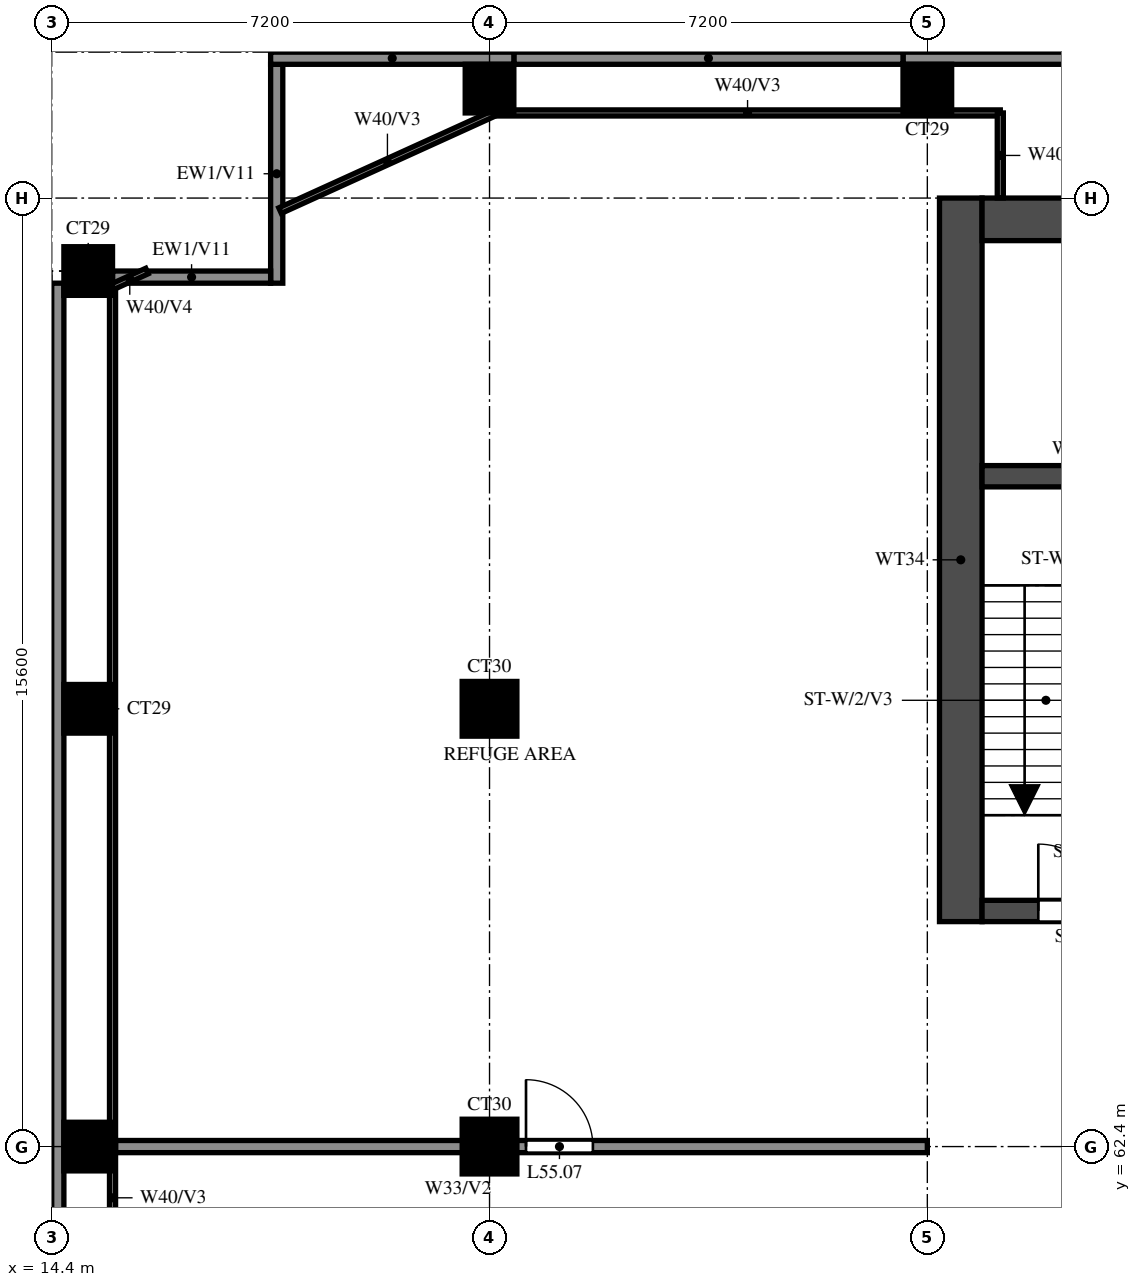
"""IFC4 building model, lengths in metres.
Left out: names, types, materials, properties, quantities, classifications, styles, units other than length and angle.
Written with IfcOpenShell. Run it as: python <this file> out.ifc"""

import sys

from ifc_helpers import new_model, si_unit, direction, frame, frame_2d, origin, origin_2d, place, context, subcontext, project, spatial, rectangle, extrude, source, transform, mapped, element, fill, save


model = new_model("IFC4")
c1 = context("Model", 3, precision=1e-05, world=origin(), true_north=direction((0.0, 1.0)))
c2 = subcontext(c1, "Body", "Model", "MODEL_VIEW")
j1 = project(units=[si_unit("LENGTHUNIT", "METRE"), si_unit("PLANEANGLEUNIT", "RADIAN")], contexts=[c1])
p1 = place(None, origin())
s1 = spatial("IfcSite", under=j1, at=p1, CompositionType="ELEMENT")
p2 = place(p1, origin())
s2 = spatial("IfcBuilding", under=s1, at=p2, CompositionType="ELEMENT")
p3 = place(p2, frame((0.0, 0.0, 206.0)))
s3 = spatial("IfcBuildingStorey", under=s2, at=p3, CompositionType="ELEMENT", Elevation=206.0)
m1 = source(origin(), c2, "Body", "SweptSolid", [
    extrude(rectangle(XDim=0.8, YDim=0.8, at=origin_2d()), origin(), (0.0, 0.0, 1.0), 5.22),
])
p4 = place(p3, frame((15.0, 62.4, 0.0), z_axis=(0.0, 0.0, 1.0), x_axis=(1.0, 0.0, 0.0)))
e1 = element("IfcColumn", 1, at=p4, inside=s3, PredefinedType="COLUMN", context=c2, shape_type="MappedRepresentation", body=[
    mapped(m1, transform((0.0, 0.0, 0.0))),
])
m2 = source(origin(), c2, "Body", "SweptSolid", [
    extrude(rectangle(XDim=0.9, YDim=0.9, at=origin_2d()), origin(), (0.0, 0.0, 1.0), 5.22),
])
p5 = place(p3, frame((21.6, 62.4, 0.0), z_axis=(0.0, 0.0, 1.0), x_axis=(1.0, 0.0, 0.0)))
e2 = element("IfcColumn", 2, at=p5, inside=s3, PredefinedType="COLUMN", context=c2, shape_type="MappedRepresentation", body=[
    mapped(m2, transform((0.0, 0.0, 0.0))),
])
p6 = place(p3, frame((15.0, 69.6, 0.0), z_axis=(0.0, 0.0, 1.0), x_axis=(1.0, 0.0, 0.0)))
e3 = element("IfcColumn", 3, at=p6, inside=s3, PredefinedType="COLUMN", context=c2, shape_type="MappedRepresentation", body=[
    mapped(m1, transform((0.0, 0.0, 0.0))),
])
p7 = place(p3, frame((21.6, 69.6, 0.0), z_axis=(0.0, 0.0, 1.0), x_axis=(1.0, 0.0, 0.0)))
e4 = element("IfcColumn", 4, at=p7, inside=s3, PredefinedType="COLUMN", context=c2, shape_type="MappedRepresentation", body=[
    mapped(m2, transform((0.0, 0.0, 0.0))),
])
for number, where, z_axis, x_axis in (
    (5, (15.0, 76.8, 0.0), (0.0, 0.0, 1.0), (1.0, 0.0, 0.0)),
    (6, (21.6, 79.8, 0.0), (0.0, 0.0, 1.0), (1.0, 0.0, 0.0)),
    (7, (28.8, 79.8, 0.0), (0.0, 0.0, 1.0), (1.0, 0.0, 0.0)),
):
    element("IfcColumn", number, at=place(p3, frame(where, z_axis=z_axis, x_axis=x_axis)), inside=s3, PredefinedType="COLUMN", context=c2, shape_type="MappedRepresentation", body=[
        mapped(m1, transform((0.0, 0.0, 0.0))),
    ])
p8 = place(p3, frame((29.35, 66.1, 0.0), z_axis=(0.0, 0.0, 1.0), x_axis=(0.0, 1.0, 0.0)))
e8 = element("IfcWall", 8, at=p8, inside=s3, PredefinedType="SHEAR", context=c2, shape_type="SweptSolid", body=[
    extrude(rectangle(XDim=11.9, YDim=0.7, at=frame_2d((5.95, 0.0))), origin(), (0.0, 0.0, 1.0), 5.22),
])
p9 = place(p3, frame((29.7, 77.65, 0.0), z_axis=(0.0, 0.0, 1.0), x_axis=(1.0, 0.0, 0.0)))
e9 = element("IfcWall", 9, at=p9, inside=s3, PredefinedType="SHEAR", context=c2, shape_type="SweptSolid", body=[
    extrude(rectangle(XDim=41.4, YDim=0.7, at=frame_2d((20.7, 0.0))), origin(), (0.0, 0.0, 1.0), 5.22),
])
p10 = place(p3, frame((29.7, 66.275, 0.0), z_axis=(0.0, 0.0, 1.0), x_axis=(1.0, 0.0, 0.0)))
e10 = element("IfcWall", 10, at=p10, inside=s3, PredefinedType="SHEAR", context=c2, shape_type="SweptSolid", body=[
    extrude(rectangle(XDim=41.4, YDim=0.35, at=frame_2d((20.7, 0.0))), origin(), (0.0, 0.0, 1.0), 5.22),
])
p11 = place(p10, frame((0.925, 0.0, 0.0)))
e11 = element("IfcOpeningElement", 11, at=p11, cuts=e10, PredefinedType="OPENING", context=c2, shape_type="SweptSolid", body=[
    extrude(rectangle(XDim=1.1, YDim=2.1, at=frame_2d((0.55, 1.05))), frame((0.0, 0.185, 0.0), z_axis=(0.0, -1.0, 0.0), x_axis=(1.0, 0.0, 0.0)), (0.0, 0.0, 1.0), 0.37),
])
p12 = place(p10, frame((3.712, 0.0, 0.0)))
e12 = element("IfcOpeningElement", 12, at=p12, cuts=e10, PredefinedType="OPENING", context=c2, shape_type="SweptSolid", body=[
    extrude(rectangle(XDim=1.8, YDim=2.1, at=frame_2d((0.9, 1.05))), frame((0.0, 0.185, 0.0), z_axis=(0.0, -1.0, 0.0), x_axis=(1.0, 0.0, 0.0)), (0.0, 0.0, 1.0), 0.37),
])
p13 = place(p3, frame((29.7, 73.425, 0.0), z_axis=(0.0, 0.0, 1.0), x_axis=(1.0, 0.0, 0.0)))
e13 = element("IfcWall", 13, at=p13, inside=s3, PredefinedType="SHEAR", context=c2, shape_type="SweptSolid", body=[
    extrude(rectangle(XDim=3.125, YDim=0.35, at=frame_2d((1.562, 0.0))), origin(), (0.0, 0.0, 1.0), 5.22),
])
p14 = place(p3, frame((18.1, 80.2, 0.0), z_axis=(0.0, 0.0, 1.0), x_axis=(0.0, -1.0, 0.0)))
e14 = element("IfcWall", 14, at=p14, inside=s3, PredefinedType="SOLIDWALL", context=c2, shape_type="SweptSolid", body=[
    extrude(rectangle(XDim=3.6, YDim=0.2, at=frame_2d((1.8, 0.0))), origin(), (0.0, 0.0, 1.0), 5.22),
])
p15 = place(p3, frame((18.0, 76.7, 0.0), z_axis=(0.0, 0.0, 1.0), x_axis=(-1.0, 0.0, 0.0)))
e15 = element("IfcWall", 15, at=p15, inside=s3, PredefinedType="SOLIDWALL", context=c2, shape_type="SweptSolid", body=[
    extrude(rectangle(XDim=2.6, YDim=0.2, at=frame_2d((1.3, 0.0))), origin(), (0.0, 0.0, 1.0), 5.22),
])
p16 = place(p3, frame((14.5, 76.6, 0.0), z_axis=(0.0, 0.0, 1.0), x_axis=(0.0, -1.0, 0.0)))
e16 = element("IfcWall", 16, at=p16, inside=s3, PredefinedType="SOLIDWALL", context=c2, shape_type="SweptSolid", body=[
    extrude(rectangle(XDim=33.4, YDim=0.2, at=frame_2d((16.7, 0.0))), origin(), (0.0, 0.0, 1.0), 5.22),
])
p17 = place(p3, frame((15.45, 62.4, 0.0), z_axis=(0.0, 0.0, 1.0), x_axis=(1.0, 0.0, 0.0)))
e17 = element("IfcWall", 17, at=p17, inside=s3, PredefinedType="SOLIDWALL", context=c2, shape_type="SweptSolid", body=[
    extrude(rectangle(XDim=13.35, YDim=0.2, at=frame_2d((6.675, 0.0))), origin(), (0.0, 0.0, 1.0), 3.72),
])
p18 = place(p17, frame((6.75, 0.0, 0.0)))
e18 = element("IfcOpeningElement", 18, at=p18, cuts=e17, PredefinedType="OPENING", context=c2, shape_type="SweptSolid", body=[
    extrude(rectangle(XDim=1.1, YDim=2.1, at=frame_2d((0.55, 1.05))), frame((0.0, 0.11, 0.0), z_axis=(0.0, -1.0, 0.0), x_axis=(1.0, 0.0, 0.0)), (0.0, 0.0, 1.0), 0.22),
])
p19 = place(p3, frame((21.687, 79.4, 0.0), z_axis=(0.0, 0.0, 1.0), x_axis=(1.0, 0.0, 0.0)))
e19 = element("IfcWall", 19, at=p19, inside=s3, PredefinedType="PARTITIONING", context=c2, shape_type="SweptSolid", body=[
    extrude(rectangle(XDim=8.313, YDim=0.1, at=frame_2d((4.156, 0.0))), origin(), (0.0, 0.0, 1.0), 3.72),
])
p20 = place(p3, frame((15.4, 48.0, 0.0), z_axis=(0.0, 0.0, 1.0), x_axis=(0.0, 1.0, 0.0)))
e20 = element("IfcWall", 20, at=p20, inside=s3, PredefinedType="PARTITIONING", context=c2, shape_type="SweptSolid", body=[
    extrude(rectangle(XDim=28.542, YDim=0.1, at=frame_2d((14.271, 0.0))), origin(), (0.0, 0.0, 1.0), 3.72),
])
p21 = place(p3, frame((30.0, 78.002, 0.0), z_axis=(0.0, 0.0, 1.0), x_axis=(0.0, 1.0, 0.0)))
e21 = element("IfcWall", 21, at=p21, inside=s3, PredefinedType="PARTITIONING", context=c2, shape_type="SweptSolid", body=[
    extrude(rectangle(XDim=1.398, YDim=0.1, at=frame_2d((0.699, 0.0))), origin(), (0.0, 0.0, 1.0), 5.22),
])
p22 = place(p3, frame((15.967, 76.8, 0.0), z_axis=(0.0, 0.0, 1.0), x_axis=(-0.910205385289, -0.41415716412, 0.0)))
e22 = element("IfcWall", 22, at=p22, inside=s3, PredefinedType="PARTITIONING", context=c2, shape_type="SweptSolid", body=[
    extrude(rectangle(XDim=0.623, YDim=0.1, at=frame_2d((0.312, 0.0))), origin(), (0.0, 0.0, 1.0), 5.22),
])
p23 = place(p3, frame((21.687, 79.4, 0.0), z_axis=(0.0, 0.0, 1.0), x_axis=(-0.910316907758, -0.413911980316, 0.0)))
e23 = element("IfcWall", 23, at=p23, inside=s3, PredefinedType="PARTITIONING", context=c2, shape_type="SweptSolid", body=[
    extrude(rectangle(XDim=3.88, YDim=0.1, at=frame_2d((1.94, 0.0))), origin(), (0.0, 0.0, 1.0), 3.72),
])
p24 = place(p3, frame((72.4, 80.3, 0.0), z_axis=(0.0, 0.0, 1.0), x_axis=(-1.0, 0.0, 0.0)))
e24 = element("IfcWall", 24, at=p24, inside=s3, PredefinedType="SOLIDWALL", context=c2, shape_type="SweptSolid", body=[
    extrude(rectangle(XDim=44.0, YDim=0.2, at=frame_2d((22.0, 0.0))), origin(), (0.0, 0.0, 1.0), 5.22),
])
p25 = place(p3, frame((28.4, 80.3, 0.0), z_axis=(0.0, 0.0, 1.0), x_axis=(-1.0, 0.0, 0.0)))
e25 = element("IfcWall", 25, at=p25, inside=s3, PredefinedType="SOLIDWALL", context=c2, shape_type="SweptSolid", body=[
    extrude(rectangle(XDim=6.4, YDim=0.2, at=frame_2d((3.2, 0.0))), origin(), (0.0, 0.0, 1.0), 3.72),
])
p26 = place(p3, frame((22.0, 80.3, 0.0), z_axis=(0.0, 0.0, 1.0), x_axis=(-1.0, 0.0, 0.0)))
e26 = element("IfcWall", 26, at=p26, inside=s3, PredefinedType="SOLIDWALL", context=c2, shape_type="SweptSolid", body=[
    extrude(rectangle(XDim=4.0, YDim=0.2, at=frame_2d((2.0, 0.0))), origin(), (0.0, 0.0, 1.0), 5.22),
])
p27 = place(p11, origin())
e27 = element("IfcDoor", 27, at=p27, inside=s3, OperationType="SINGLE_SWING_LEFT", PredefinedType="DOOR", context=c2, shape_type="SweptSolid", body=[
    extrude(rectangle(XDim=1.1, YDim=2.1, at=frame_2d((0.55, 1.05))), frame((0.0, 0.025, 0.0), z_axis=(0.0, -1.0, 0.0), x_axis=(1.0, 0.0, 0.0)), (0.0, 0.0, 1.0), 0.05),
])
fill(e11, e27)
p28 = place(p18, origin())
e28 = element("IfcDoor", 28, at=p28, inside=s3, OperationType="SINGLE_SWING_RIGHT", PredefinedType="DOOR", context=c2, shape_type="SweptSolid", body=[
    extrude(rectangle(XDim=1.1, YDim=2.1, at=frame_2d((0.55, 1.05))), frame((0.0, 0.025, 0.0), z_axis=(0.0, -1.0, 0.0), x_axis=(1.0, 0.0, 0.0)), (0.0, 0.0, 1.0), 0.05),
])
fill(e18, e28)
save(model, sys.argv[1])
